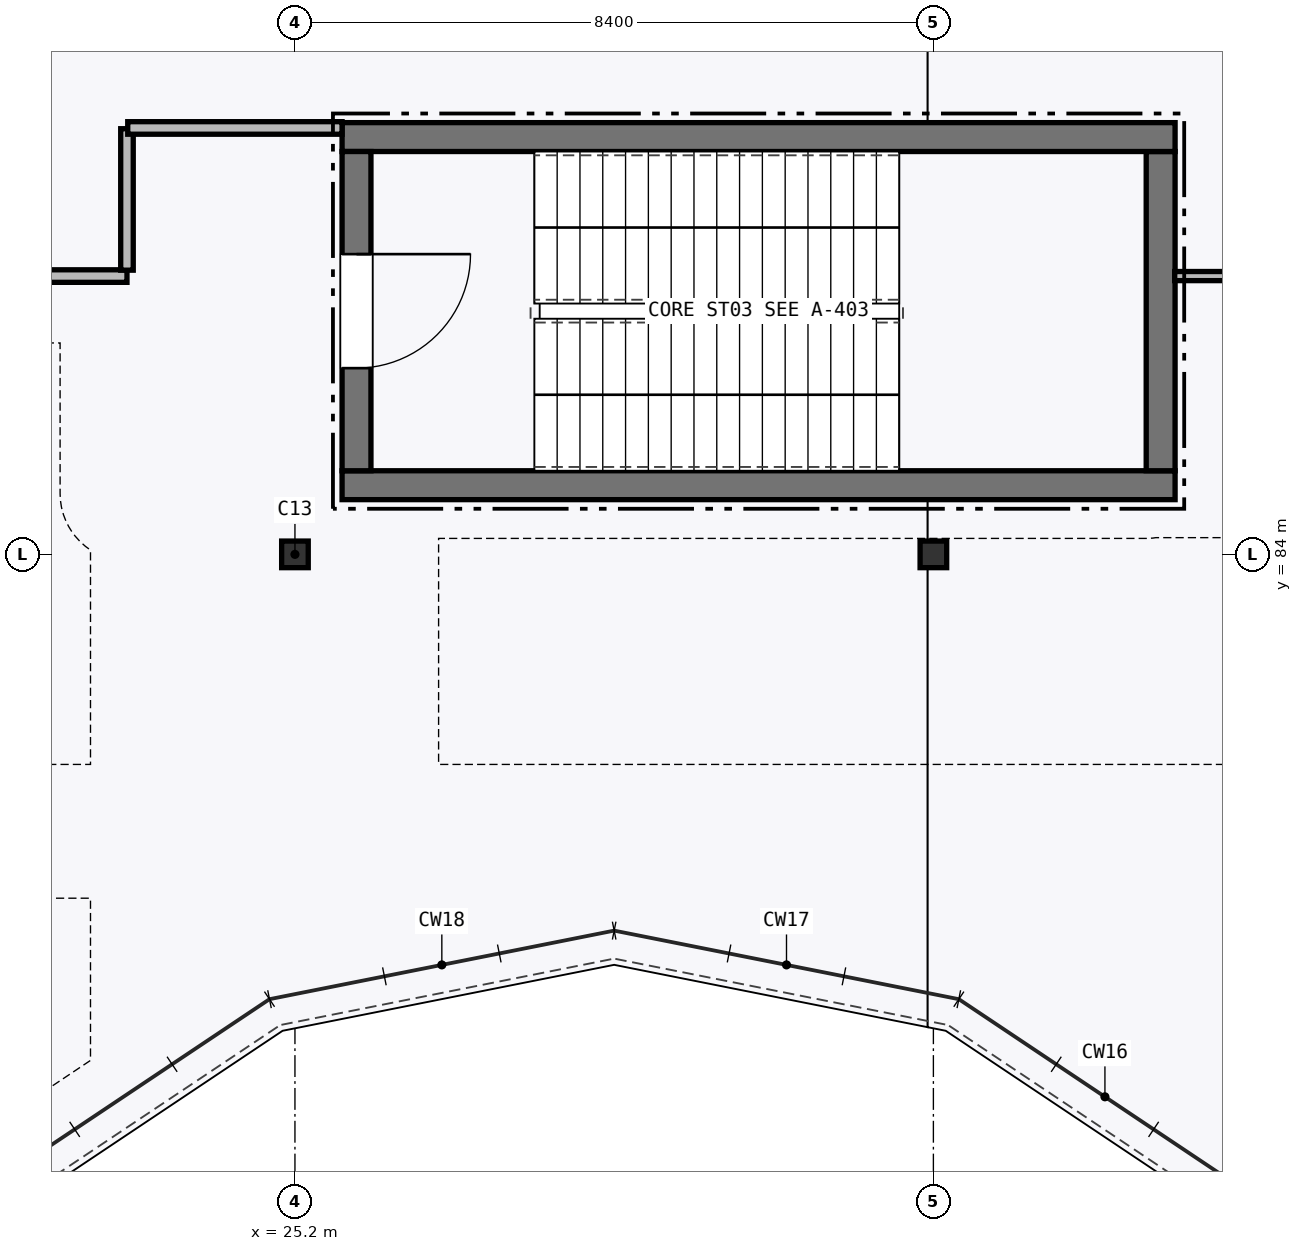
"""IFC4 building model, lengths in metres.
Left out: names, types, materials, properties, quantities, classifications, styles, units other than length and angle.
Written with IfcOpenShell. Run it as: python <this file> out.ifc"""

import sys

from ifc_helpers import new_model, si_unit, direction, frame, frame_2d, origin, origin_2d, place, context, subcontext, project, spatial, rectangle, i_section, extrude, element, fill, save


model = new_model("IFC4")
c1 = context("Model", 3, precision=1e-05, world=origin(), true_north=direction((0.0, 1.0)))
c2 = subcontext(c1, "Body", "Model", "MODEL_VIEW")
j1 = project(units=[si_unit("LENGTHUNIT", "METRE"), si_unit("PLANEANGLEUNIT", "RADIAN")], contexts=[c1])
p1 = place(None, origin())
s1 = spatial("IfcSite", under=j1, at=p1, CompositionType="ELEMENT")
p2 = place(p1, origin())
s2 = spatial("IfcBuilding", under=s1, at=p2, CompositionType="ELEMENT")
p3 = place(p2, frame((0.0, 0.0, 11.4)))
s3 = spatial("IfcBuildingStorey", under=s2, at=p3, CompositionType="ELEMENT", Elevation=11.4)
for number, where, z_axis, x_axis in (
    (1, (25.2, 84.0, 0.0), (0.0, 0.0, 1.0), (1.0, 0.0, 0.0)),
    (2, (33.6, 84.0, 0.0), (0.0, 0.0, 1.0), (1.0, 0.0, 0.0)),
):
    element("IfcColumn", number, at=place(p3, frame(where, z_axis=z_axis, x_axis=x_axis)), inside=s3, PredefinedType="COLUMN", context=c2, shape_type="SweptSolid", body=[
        extrude(i_section(OverallWidth=0.35, OverallDepth=0.35, WebThickness=0.012, FlangeThickness=0.019, FilletRadius=0.02, at=origin_2d()), origin(), (0.0, 0.0, 1.0), 5.1),
    ])
p4 = place(p3, frame((25.82, 84.91, 0.0), z_axis=(0.0, 0.0, 1.0), x_axis=(1.0, 0.0, 0.0)))
e3 = element("IfcWall", 3, at=p4, inside=s3, PredefinedType="SHEAR", context=c2, shape_type="SweptSolid", body=[
    extrude(rectangle(XDim=10.96, YDim=0.38, at=frame_2d((5.48, 0.0))), origin(), (0.0, 0.0, 1.0), 4.845),
])
p5 = place(p3, frame((36.59, 85.1, 0.0), z_axis=(0.0, 0.0, 1.0), x_axis=(0.0, 1.0, 0.0)))
e4 = element("IfcWall", 4, at=p5, inside=s3, PredefinedType="SHEAR", context=c2, shape_type="SweptSolid", body=[
    extrude(rectangle(XDim=4.2, YDim=0.38, at=frame_2d((2.1, 0.0))), origin(), (0.0, 0.0, 1.0), 4.845),
])
p6 = place(p3, frame((36.78, 89.49, 0.0), z_axis=(0.0, 0.0, 1.0), x_axis=(-1.0, 0.0, 0.0)))
e5 = element("IfcWall", 5, at=p6, inside=s3, PredefinedType="SHEAR", context=c2, shape_type="SweptSolid", body=[
    extrude(rectangle(XDim=10.96, YDim=0.38, at=frame_2d((5.48, 0.0))), origin(), (0.0, 0.0, 1.0), 4.845),
])
p7 = place(p3, frame((26.01, 89.3, 0.0), z_axis=(0.0, 0.0, 1.0), x_axis=(0.0, -1.0, 0.0)))
e6 = element("IfcWall", 6, at=p7, inside=s3, PredefinedType="SHEAR", context=c2, shape_type="SweptSolid", body=[
    extrude(rectangle(XDim=4.2, YDim=0.38, at=frame_2d((2.1, 0.0))), origin(), (0.0, 0.0, 1.0), 4.845),
])
p8 = place(p7, frame((1.35, 0.0, 0.0)))
e7 = element("IfcOpeningElement", 7, at=p8, cuts=e6, PredefinedType="OPENING", context=c2, shape_type="SweptSolid", body=[
    extrude(rectangle(XDim=1.5, YDim=2.15, at=frame_2d((0.75, 1.075))), frame((0.0, 0.2, 0.0), z_axis=(0.0, -1.0, 0.0), x_axis=(1.0, 0.0, 0.0)), (0.0, 0.0, 1.0), 0.4),
])
p9 = place(p3, frame((43.335, 87.661, 0.0), z_axis=(0.0, 0.0, 1.0), x_axis=(-1.0, 0.0, 0.0)))
e8 = element("IfcWall", 8, at=p9, inside=s3, PredefinedType="PARTITIONING", context=c2, shape_type="SweptSolid", body=[
    extrude(rectangle(XDim=6.56, YDim=0.12, at=frame_2d((3.28, 0.0))), origin(), (0.0, 0.0, 1.0), 4.845),
])
p10 = place(p3, frame((16.915, 87.661, 0.0), z_axis=(0.0, 0.0, 1.0), x_axis=(1.0, 0.0, 0.0)))
e9 = element("IfcWall", 9, at=p10, inside=s3, PredefinedType="PARTITIONING", context=c2, shape_type="SweptSolid", body=[
    extrude(rectangle(XDim=6.075, YDim=0.165, at=frame_2d((3.038, 0.0))), origin(), (0.0, 0.0, 1.0), 4.845),
])
p11 = place(p10, frame((2.387, 0.0, 0.0)))
e10 = element("IfcOpeningElement", 10, at=p11, cuts=e9, PredefinedType="OPENING", context=c2, shape_type="SweptSolid", body=[
    extrude(rectangle(XDim=1.3, YDim=2.2, at=frame_2d((0.65, 1.1))), frame((0.0, 0.093, 0.0), z_axis=(0.0, -1.0, 0.0), x_axis=(1.0, 0.0, 0.0)), (0.0, 0.0, 1.0), 0.185),
])
p12 = place(p3, frame((22.99, 87.739, 0.0), z_axis=(0.0, 0.0, 1.0), x_axis=(0.0, 1.0, 0.0)))
e11 = element("IfcWall", 11, at=p12, inside=s3, PredefinedType="PARTITIONING", context=c2, shape_type="SweptSolid", body=[
    extrude(rectangle(XDim=1.861, YDim=0.165, at=frame_2d((0.931, 0.0))), origin(), (0.0, 0.0, 1.0), 4.845),
])
p13 = place(p3, frame((23.0, 89.61, 0.0), z_axis=(0.0, 0.0, 1.0), x_axis=(1.0, 0.0, 0.0)))
e12 = element("IfcWall", 12, at=p13, inside=s3, PredefinedType="PARTITIONING", context=c2, shape_type="SweptSolid", body=[
    extrude(rectangle(XDim=2.82, YDim=0.165, at=frame_2d((1.41, 0.0))), origin(), (0.0, 0.0, 1.0), 4.845),
])
p14 = place(p8, origin())
e13 = element("IfcDoor", 13, at=p14, inside=s3, OperationType="SINGLE_SWING_LEFT", PredefinedType="DOOR", context=c2, shape_type="SweptSolid", body=[
    extrude(rectangle(XDim=1.5, YDim=2.15, at=frame_2d((0.75, 1.075))), frame((0.0, 0.025, 0.0), z_axis=(0.0, -1.0, 0.0), x_axis=(1.0, 0.0, 0.0)), (0.0, 0.0, 1.0), 0.05),
])
fill(e7, e13)
save(model, sys.argv[1])
